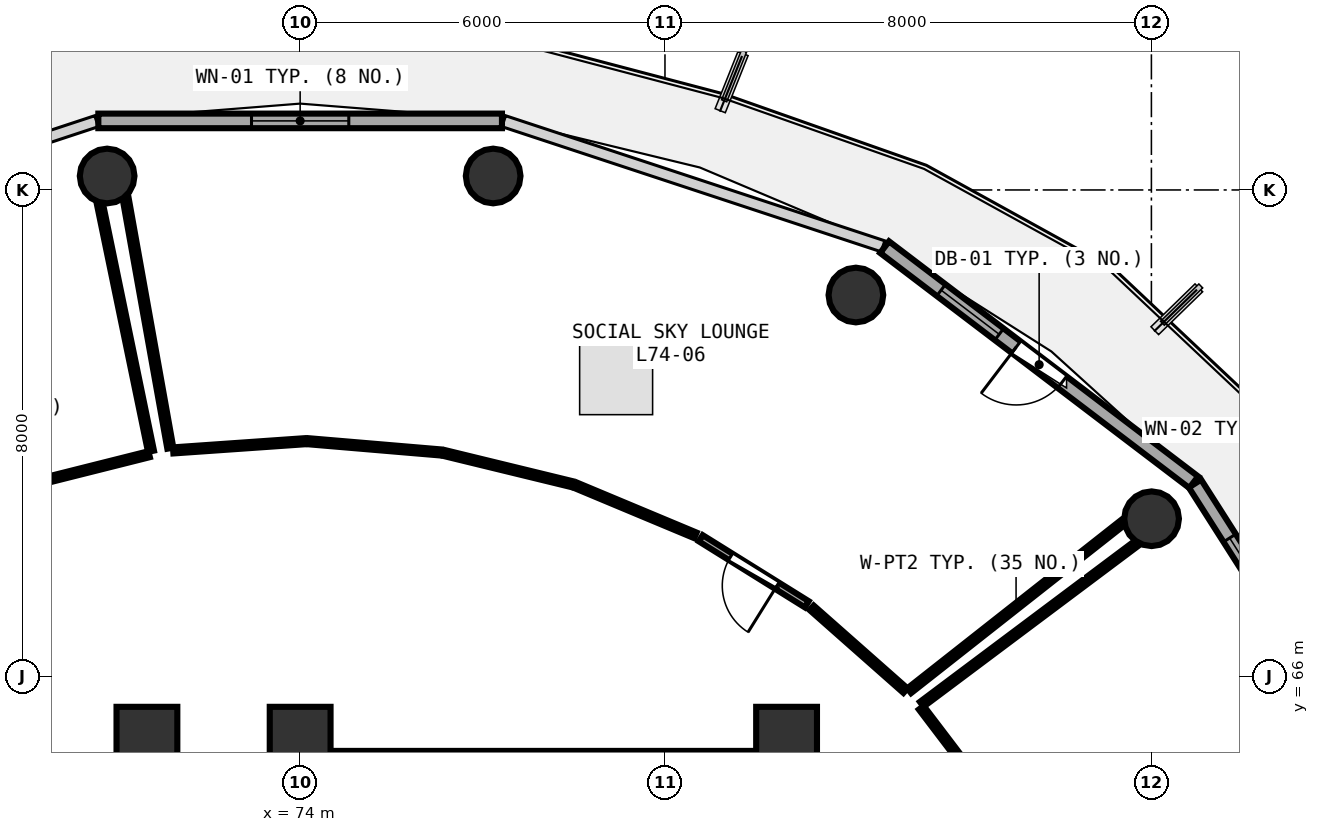
"""IFC4 building model, lengths in metres.
Left out: names, types, materials, properties, quantities, classifications, styles, units other than length and angle.
Written with IfcOpenShell. Run it as: python <this file> out.ifc"""

import sys

from ifc_helpers import new_model, si_unit, direction, frame, frame_2d, origin, origin_2d, place, context, subcontext, project, spatial, rectangle, circle, extrude, element, fill, save


model = new_model("IFC4")
c1 = context("Model", 3, precision=1e-05, world=origin(), true_north=direction((0.0, 1.0)))
c2 = subcontext(c1, "Body", "Model", "MODEL_VIEW")
j1 = project(units=[si_unit("LENGTHUNIT", "METRE"), si_unit("PLANEANGLEUNIT", "RADIAN")], contexts=[c1])
p1 = place(None, origin())
s1 = spatial("IfcSite", under=j1, at=p1, CompositionType="ELEMENT")
p2 = place(p1, origin())
s2 = spatial("IfcBuilding", under=s1, at=p2, CompositionType="ELEMENT")
p3 = place(p2, frame((0.0, 0.0, 289.95)))
s3 = spatial("IfcBuildingStorey", under=s2, at=p3, CompositionType="ELEMENT", Elevation=289.95)
for number, where, z_axis, x_axis in (
    (1, (82.0, 65.0, 0.0), (0.0, 0.0, 1.0), (1.0, 0.0, 0.0)),
    (2, (74.0, 65.0, 0.0), (0.0, 0.0, 1.0), (1.0, 0.0, 0.0)),
    (3, (71.48, 65.0, 0.0), (0.0, 0.0, 1.0), (1.0, 0.0, 0.0)),
):
    element("IfcColumn", number, at=place(p3, frame(where, z_axis=z_axis, x_axis=x_axis)), inside=s3, PredefinedType="PILASTER", context=c2, shape_type="SweptSolid", body=[
        extrude(rectangle(XDim=1.0, YDim=1.0, at=origin_2d()), origin(), (0.0, 0.0, 1.0), 3.75),
    ])
for number, where, z_axis, x_axis in (
    (4, (88.003, 68.593, 0.0), (0.0, 0.0, 1.0), (1.0, 0.0, 0.0)),
    (5, (83.14, 72.272, 0.0), (0.0, 0.0, 1.0), (1.0, 0.0, 0.0)),
    (6, (77.174, 74.229, 0.0), (0.0, 0.0, 1.0), (1.0, 0.0, 0.0)),
    (7, (70.826, 74.229, 0.0), (0.0, 0.0, 1.0), (1.0, 0.0, 0.0)),
):
    element("IfcColumn", number, at=place(p3, frame(where, z_axis=z_axis, x_axis=x_axis)), inside=s3, PredefinedType="COLUMN", context=c2, shape_type="SweptSolid", body=[
        extrude(circle(Radius=0.45, at=origin_2d()), origin(), (0.0, 0.0, 1.0), 3.75),
    ])
p4 = place(p3, frame((92.034, 63.964, 0.0), z_axis=(0.0, 0.0, 1.0), x_axis=(-0.537271968456, 0.843409053728, 0.0)))
e8 = element("IfcWall", 8, at=p4, inside=s3, PredefinedType="SOLIDWALL", context=c2, shape_type="SweptSolid", body=[
    extrude(rectangle(XDim=6.175, YDim=0.24, at=frame_2d((3.087, 0.0))), origin(), (0.0, 0.0, 1.0), 3.415),
])
p5 = place(p4, frame((2.613, 0.0, 0.0)))
e9 = element("IfcOpeningElement", 9, at=p5, cuts=e8, PredefinedType="OPENING", context=c2, shape_type="SweptSolid", body=[
    extrude(rectangle(XDim=0.95, YDim=2.1, at=frame_2d((0.475, 1.05))), frame((0.0, 0.13, 0.0), z_axis=(0.0, -1.0, 0.0), x_axis=(1.0, 0.0, 0.0)), (0.0, 0.0, 1.0), 0.26),
])
p6 = place(p4, frame((3.913, 0.0, 0.85)))
e10 = element("IfcOpeningElement", 10, at=p6, cuts=e8, PredefinedType="OPENING", context=c2, shape_type="SweptSolid", body=[
    extrude(rectangle(XDim=1.2, YDim=1.45, at=frame_2d((0.6, 0.725))), frame((0.0, 0.13, 0.0), z_axis=(0.0, -1.0, 0.0), x_axis=(1.0, 0.0, 0.0)), (0.0, 0.0, 1.0), 0.26),
])
p7 = place(p3, frame((88.696, 69.194, 0.0), z_axis=(0.0, 0.0, 1.0), x_axis=(-0.796010444211, 0.605282886514, 0.0)))
e11 = element("IfcWall", 11, at=p7, inside=s3, PredefinedType="SOLIDWALL", context=c2, shape_type="SweptSolid", body=[
    extrude(rectangle(XDim=6.387, YDim=0.24, at=frame_2d((3.194, 0.0))), origin(), (0.0, 0.0, 1.0), 3.415),
])
p8 = place(p7, frame((2.719, 0.0, 0.0)))
e12 = element("IfcOpeningElement", 12, at=p8, cuts=e11, PredefinedType="OPENING", context=c2, shape_type="SweptSolid", body=[
    extrude(rectangle(XDim=0.95, YDim=2.1, at=frame_2d((0.475, 1.05))), frame((0.0, 0.13, 0.0), z_axis=(0.0, -1.0, 0.0), x_axis=(1.0, 0.0, 0.0)), (0.0, 0.0, 1.0), 0.26),
])
p9 = place(p7, frame((4.019, 0.0, 0.85)))
e13 = element("IfcOpeningElement", 13, at=p9, cuts=e11, PredefinedType="OPENING", context=c2, shape_type="SweptSolid", body=[
    extrude(rectangle(XDim=1.2, YDim=1.45, at=frame_2d((0.6, 0.725))), frame((0.0, 0.13, 0.0), z_axis=(0.0, -1.0, 0.0), x_axis=(1.0, 0.0, 0.0)), (0.0, 0.0, 1.0), 0.26),
])
p10 = place(p3, frame((77.319, 75.136, 0.0), z_axis=(0.0, 0.0, 1.0), x_axis=(-1.0, 0.0, 0.0)))
e14 = element("IfcWall", 14, at=p10, inside=s3, PredefinedType="SOLIDWALL", context=c2, shape_type="SweptSolid", body=[
    extrude(rectangle(XDim=6.638, YDim=0.24, at=frame_2d((3.319, 0.0))), origin(), (0.0, 0.0, 1.0), 3.415),
])
p11 = place(p10, frame((2.519, 0.0, 0.85)))
e15 = element("IfcOpeningElement", 15, at=p11, cuts=e14, PredefinedType="OPENING", context=c2, shape_type="SweptSolid", body=[
    extrude(rectangle(XDim=1.6, YDim=1.45, at=frame_2d((0.8, 0.725))), frame((0.0, 0.13, 0.0), z_axis=(0.0, -1.0, 0.0), x_axis=(1.0, 0.0, 0.0)), (0.0, 0.0, 1.0), 0.26),
])
p12 = place(p3, frame((74.0, 64.6, 0.0), z_axis=(0.0, 0.0, 1.0), x_axis=(1.0, 0.0, 0.0)))
e16 = element("IfcWall", 16, at=p12, inside=s3, PredefinedType="SHEAR", context=c2, shape_type="SweptSolid", body=[
    extrude(rectangle(XDim=8.0, YDim=0.35, at=frame_2d((4.0, 0.0))), origin(), (0.0, 0.0, 1.0), 3.43),
])
p13 = place(p3, frame((82.332, 67.187, 0.0), z_axis=(0.0, 0.0, 1.0), x_axis=(-0.848878791214, 0.528587549823, 0.0)))
e17 = element("IfcWall", 17, at=p13, inside=s3, PredefinedType="PARTITIONING", context=c2, shape_type="SweptSolid", body=[
    extrude(rectangle(XDim=2.053, YDim=0.12, at=frame_2d((1.027, 0.0))), origin(), (0.0, 0.0, 1.0), 3.015),
])
p14 = place(p13, frame((0.577, 0.0, 0.0)))
e18 = element("IfcOpeningElement", 18, at=p14, cuts=e17, PredefinedType="OPENING", context=c2, shape_type="SweptSolid", body=[
    extrude(rectangle(XDim=0.9, YDim=2.08, at=frame_2d((0.45, 1.04))), frame((0.0, 0.07, 0.0), z_axis=(0.0, -1.0, 0.0), x_axis=(1.0, 0.0, 0.0)), (0.0, 0.0, 1.0), 0.14),
])
p15 = place(p3, frame((71.516, 69.654, 0.0), z_axis=(0.0, 0.0, 1.0), x_axis=(-0.969827312174, -0.243792913272, 0.0)))
e19 = element("IfcWall", 19, at=p15, inside=s3, PredefinedType="PARTITIONING", context=c2, shape_type="SweptSolid", body=[
    extrude(rectangle(XDim=2.147, YDim=0.1, at=frame_2d((1.073, 0.0))), origin(), (0.0, 0.0, 1.0), 3.015),
])
p16 = place(p3, frame((70.707, 73.77, 0.0), z_axis=(0.0, 0.0, 1.0), x_axis=(0.202308141573, -0.979321916355, 0.0)))
e20 = element("IfcWall", 20, at=p16, inside=s3, PredefinedType="PARTITIONING", context=c2, shape_type="SweptSolid", body=[
    extrude(rectangle(XDim=4.153, YDim=0.1, at=frame_2d((2.076, 0.0))), origin(), (0.0, 0.0, 1.0), 3.015),
])
p17 = place(p3, frame((85.435, 63.883, 0.0), z_axis=(0.0, 0.0, 1.0), x_axis=(-0.605473441765, 0.795865510823, 0.0)))
e21 = element("IfcWall", 21, at=p17, inside=s3, PredefinedType="PARTITIONING", context=c2, shape_type="SweptSolid", body=[
    extrude(rectangle(XDim=2.014, YDim=0.1, at=frame_2d((1.007, 0.0))), origin(), (0.0, 0.0, 1.0), 3.015),
])
p18 = place(p3, frame((84.223, 65.542, 0.0), z_axis=(0.0, 0.0, 1.0), x_axis=(0.800384816546, 0.599486568191, 0.0)))
e22 = element("IfcWall", 22, at=p18, inside=s3, PredefinedType="PARTITIONING", context=c2, shape_type="SweptSolid", body=[
    extrude(rectangle(XDim=4.414, YDim=0.1, at=frame_2d((2.207, 0.0))), origin(), (0.0, 0.0, 1.0), 3.115),
])
p19 = place(p3, frame((83.955, 65.767, 0.0), z_axis=(0.0, 0.0, 1.0), x_axis=(-0.749539941976, 0.661959119117, 0.0)))
e23 = element("IfcWall", 23, at=p19, inside=s3, PredefinedType="PARTITIONING", context=c2, shape_type="SweptSolid", body=[
    extrude(rectangle(XDim=2.057, YDim=0.1, at=frame_2d((1.029, 0.0))), origin(), (0.0, 0.0, 1.0), 3.015),
])
p20 = place(p3, frame((80.501, 68.319, 0.0), z_axis=(0.0, 0.0, 1.0), x_axis=(-0.922644563927, 0.385651408213, 0.0)))
e24 = element("IfcWall", 24, at=p20, inside=s3, PredefinedType="PARTITIONING", context=c2, shape_type="SweptSolid", body=[
    extrude(rectangle(XDim=2.125, YDim=0.1, at=frame_2d((1.062, 0.0))), origin(), (0.0, 0.0, 1.0), 3.42),
])
p21 = place(p3, frame((78.465, 69.164, 0.0), z_axis=(0.0, 0.0, 1.0), x_axis=(-0.971628772742, 0.236511158257, 0.0)))
e25 = element("IfcWall", 25, at=p21, inside=s3, PredefinedType="PARTITIONING", context=c2, shape_type="SweptSolid", body=[
    extrude(rectangle(XDim=2.147, YDim=0.1, at=frame_2d((1.074, 0.0))), origin(), (0.0, 0.0, 1.0), 3.42),
])
p22 = place(p3, frame((76.3, 69.684, 0.0), z_axis=(0.0, 0.0, 1.0), x_axis=(-0.99643184896, 0.084401246306, 0.0)))
e26 = element("IfcWall", 26, at=p22, inside=s3, PredefinedType="PARTITIONING", context=c2, shape_type="SweptSolid", body=[
    extrude(rectangle(XDim=2.161, YDim=0.1, at=frame_2d((1.081, 0.0))), origin(), (0.0, 0.0, 1.0), 3.015),
])
p23 = place(p3, frame((74.067, 69.867, 0.0), z_axis=(0.0, 0.0, 1.0), x_axis=(-0.997574370957, -0.069608723664, 0.0)))
e27 = element("IfcWall", 27, at=p23, inside=s3, PredefinedType="PARTITIONING", context=c2, shape_type="SweptSolid", body=[
    extrude(rectangle(XDim=2.16, YDim=0.1, at=frame_2d((1.08, 0.0))), origin(), (0.0, 0.0, 1.0), 3.42),
])
p24 = place(p3, frame((71.865, 69.753, 0.0), z_axis=(0.0, 0.0, 1.0), x_axis=(-0.176199339585, 0.984354505618, 0.0)))
e28 = element("IfcWall", 28, at=p24, inside=s3, PredefinedType="PARTITIONING", context=c2, shape_type="SweptSolid", body=[
    extrude(rectangle(XDim=4.176, YDim=0.1, at=frame_2d((2.088, 0.0))), origin(), (0.0, 0.0, 1.0), 3.115),
])
p25 = place(p3, frame((87.532, 68.532, 0.0), z_axis=(0.0, 0.0, 1.0), x_axis=(-0.785736749878, -0.618561039745, 0.0)))
e29 = element("IfcWall", 29, at=p25, inside=s3, PredefinedType="PARTITIONING", context=c2, shape_type="SweptSolid", body=[
    extrude(rectangle(XDim=4.475, YDim=0.1, at=frame_2d((2.237, 0.0))), origin(), (0.0, 0.0, 1.0), 3.015),
])
p26 = place(p6, origin())
e30 = element("IfcWindow", 30, at=p26, inside=s3, PartitioningType="SINGLE_PANEL", PredefinedType="WINDOW", context=c2, shape_type="SweptSolid", body=[
    extrude(rectangle(XDim=1.2, YDim=1.45, at=frame_2d((0.6, 0.725))), frame((0.0, 0.03, 0.0), z_axis=(0.0, -1.0, 0.0), x_axis=(1.0, 0.0, 0.0)), (0.0, 0.0, 1.0), 0.06),
])
fill(e10, e30)
p27 = place(p8, frame((0.95, 0.0, 0.0), z_axis=(0.0, 0.0, 1.0), x_axis=(-1.0, 0.0, 0.0)))
e31 = element("IfcDoor", 31, at=p27, inside=s3, OperationType="SINGLE_SWING_LEFT", PredefinedType="DOOR", context=c2, shape_type="SweptSolid", body=[
    extrude(rectangle(XDim=0.95, YDim=2.1, at=frame_2d((0.475, 1.05))), frame((0.0, 0.025, 0.0), z_axis=(0.0, -1.0, 0.0), x_axis=(1.0, 0.0, 0.0)), (0.0, 0.0, 1.0), 0.05),
])
fill(e12, e31)
p28 = place(p9, origin())
e32 = element("IfcWindow", 32, at=p28, inside=s3, PartitioningType="SINGLE_PANEL", PredefinedType="WINDOW", context=c2, shape_type="SweptSolid", body=[
    extrude(rectangle(XDim=1.2, YDim=1.45, at=frame_2d((0.6, 0.725))), frame((0.0, 0.03, 0.0), z_axis=(0.0, -1.0, 0.0), x_axis=(1.0, 0.0, 0.0)), (0.0, 0.0, 1.0), 0.06),
])
fill(e13, e32)
p29 = place(p11, origin())
e33 = element("IfcWindow", 33, at=p29, inside=s3, PartitioningType="SINGLE_PANEL", PredefinedType="WINDOW", context=c2, shape_type="SweptSolid", body=[
    extrude(rectangle(XDim=1.6, YDim=1.45, at=frame_2d((0.8, 0.725))), frame((0.0, 0.03, 0.0), z_axis=(0.0, -1.0, 0.0), x_axis=(1.0, 0.0, 0.0)), (0.0, 0.0, 1.0), 0.06),
])
fill(e15, e33)
p30 = place(p14, origin())
e34 = element("IfcDoor", 34, at=p30, inside=s3, OperationType="SINGLE_SWING_LEFT", PredefinedType="DOOR", context=c2, shape_type="SweptSolid", body=[
    extrude(rectangle(XDim=0.9, YDim=2.08, at=frame_2d((0.45, 1.04))), frame((0.0, 0.025, 0.0), z_axis=(0.0, -1.0, 0.0), x_axis=(1.0, 0.0, 0.0)), (0.0, 0.0, 1.0), 0.05),
])
fill(e18, e34)
save(model, sys.argv[1])
